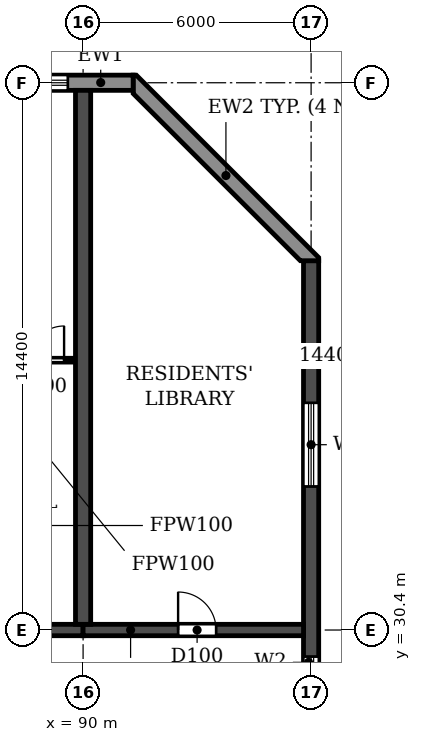
"""IFC4 building model, lengths in metres.
Left out: names, types, materials, properties, quantities, classifications, styles, units other than length and angle.
Written with IfcOpenShell. Run it as: python <this file> out.ifc"""

import sys

from ifc_helpers import new_model, si_unit, direction, frame, frame_2d, origin, place, context, subcontext, project, spatial, polyline, rectangle, outline, extrude, element, fill, save


model = new_model("IFC4")
c1 = context("Model", 3, precision=1e-05, world=origin(), true_north=direction((0.0, 1.0)))
c2 = subcontext(c1, "Body", "Model", "MODEL_VIEW")
j1 = project(units=[si_unit("LENGTHUNIT", "METRE"), si_unit("PLANEANGLEUNIT", "RADIAN")], contexts=[c1])
p1 = place(None, origin())
s1 = spatial("IfcSite", under=j1, at=p1, CompositionType="ELEMENT")
p2 = place(p1, origin())
s2 = spatial("IfcBuilding", under=s1, at=p2, CompositionType="ELEMENT")
p3 = place(p2, frame((0.0, 0.0, 63.0)))
s3 = spatial("IfcBuildingStorey", under=s2, at=p3, CompositionType="ELEMENT", Elevation=63.0)
p4 = place(p3, frame((90.0, 30.55, 0.0), z_axis=(0.0, 0.0, 1.0), x_axis=(0.0, 1.0, 0.0)))
e1 = element("IfcWall", 1, at=p4, inside=s3, PredefinedType="SHEAR", context=c2, shape_type="SweptSolid", body=[
    extrude(rectangle(XDim=14.05, YDim=0.4, at=frame_2d((7.025, 0.0))), origin(), (0.0, 0.0, 1.0), 2.95),
])
p5 = place(p3, frame((96.0, 4.683, 0.0), z_axis=(0.0, 0.0, 1.0), x_axis=(0.0, 1.0, 0.0)))
e2 = element("IfcWall", 2, at=p5, inside=s3, PredefinedType="SHEAR", context=c2, shape_type="SweptSolid", body=[
    extrude(rectangle(XDim=35.434, YDim=0.4, at=frame_2d((17.717, 0.0))), origin(), (0.0, 0.0, 1.0), 2.95),
])
p6 = place(p5, frame((15.917, 0.0, 0.9)))
e3 = element("IfcOpeningElement", 3, at=p6, cuts=e2, PredefinedType="OPENING", context=c2, shape_type="SweptSolid", body=[
    extrude(rectangle(XDim=1.2, YDim=1.5, at=frame_2d((0.6, 0.75))), frame((0.0, 0.21, 0.0), z_axis=(0.0, -1.0, 0.0), x_axis=(1.0, 0.0, 0.0)), (0.0, 0.0, 1.0), 0.42),
])
p7 = place(p5, frame((23.817, 0.0, 0.9)))
e4 = element("IfcOpeningElement", 4, at=p7, cuts=e2, PredefinedType="OPENING", context=c2, shape_type="SweptSolid", body=[
    extrude(rectangle(XDim=1.2, YDim=1.5, at=frame_2d((0.6, 0.75))), frame((0.0, 0.21, 0.0), z_axis=(0.0, -1.0, 0.0), x_axis=(1.0, 0.0, 0.0)), (0.0, 0.0, 1.0), 0.42),
])
p8 = place(p5, frame((8.017, 0.0, 0.9)))
e5 = element("IfcOpeningElement", 5, at=p8, cuts=e2, PredefinedType="OPENING", context=c2, shape_type="SweptSolid", body=[
    extrude(rectangle(XDim=1.2, YDim=1.5, at=frame_2d((0.6, 0.75))), frame((0.0, 0.21, 0.0), z_axis=(0.0, -1.0, 0.0), x_axis=(1.0, 0.0, 0.0)), (0.0, 0.0, 1.0), 0.42),
])
p9 = place(p5, frame((29.493, 0.0, 0.6)))
e6 = element("IfcOpeningElement", 6, at=p9, cuts=e2, PredefinedType="OPENING", context=c2, shape_type="SweptSolid", body=[
    extrude(rectangle(XDim=2.2, YDim=1.8, at=frame_2d((1.1, 0.9))), frame((0.0, 0.21, 0.0), z_axis=(0.0, -1.0, 0.0), x_axis=(1.0, 0.0, 0.0)), (0.0, 0.0, 1.0), 0.42),
])
p10 = place(p5, frame((2.541, 0.0, 0.6)))
e7 = element("IfcOpeningElement", 7, at=p10, cuts=e2, PredefinedType="OPENING", context=c2, shape_type="SweptSolid", body=[
    extrude(rectangle(XDim=2.2, YDim=1.8, at=frame_2d((1.1, 0.9))), frame((0.0, 0.21, 0.0), z_axis=(0.0, -1.0, 0.0), x_axis=(1.0, 0.0, 0.0)), (0.0, 0.0, 1.0), 0.42),
])
p11 = place(p3, frame((84.0, 30.4, 0.0), z_axis=(0.0, 0.0, 1.0), x_axis=(1.0, 0.0, 0.0)))
e8 = element("IfcWall", 8, at=p11, inside=s3, PredefinedType="SHEAR", context=c2, shape_type="SweptSolid", body=[
    extrude(rectangle(XDim=6.0, YDim=0.3, at=frame_2d((3.0, 0.0))), origin(), (0.0, 0.0, 1.0), 2.35),
])
p12 = place(p3, frame((90.0, 30.4, 0.0), z_axis=(0.0, 0.0, 1.0), x_axis=(1.0, 0.0, 0.0)))
e9 = element("IfcWall", 9, at=p12, inside=s3, PredefinedType="SHEAR", context=c2, shape_type="SweptSolid", body=[
    extrude(rectangle(XDim=5.8, YDim=0.3, at=frame_2d((2.9, 0.0))), origin(), (0.0, 0.0, 1.0), 2.35),
])
p13 = place(p12, frame((2.5, 0.0, 0.0)))
e10 = element("IfcOpeningElement", 10, at=p13, cuts=e9, PredefinedType="OPENING", context=c2, shape_type="SweptSolid", body=[
    extrude(rectangle(XDim=1.0, YDim=2.1, at=frame_2d((0.5, 1.05))), frame((0.0, 0.16, 0.0), z_axis=(0.0, -1.0, 0.0), x_axis=(1.0, 0.0, 0.0)), (0.0, 0.0, 1.0), 0.32),
])
p14 = place(p3, origin())
e11 = element("IfcWall", 11, at=p14, inside=s3, PredefinedType="STANDARD", context=c2, shape_type="SweptSolid", body=[
    extrude(outline(polyline([(96.2, 40.117), (96.2, 40.2), (91.4, 45.0), (91.317, 45.0), (91.317, 44.517), (95.717, 40.117), (96.2, 40.117)])), origin(), (0.0, 0.0, 1.0), 2.95),
])
p15 = place(p3, frame((91.317, 44.8, 0.0), z_axis=(0.0, 0.0, 1.0), x_axis=(-1.0, 0.0, 0.0)))
e12 = element("IfcWall", 12, at=p15, inside=s3, PredefinedType="STANDARD", context=c2, shape_type="SweptSolid", body=[
    extrude(rectangle(XDim=80.634, YDim=0.4, at=frame_2d((40.317, 0.0))), origin(), (0.0, 0.0, 1.0), 2.95),
])
p16 = place(p15, frame((76.717, 0.0, 0.9)))
e13 = element("IfcOpeningElement", 13, at=p16, cuts=e12, PredefinedType="OPENING", context=c2, shape_type="SweptSolid", body=[
    extrude(rectangle(XDim=2.2, YDim=1.5, at=frame_2d((1.1, 0.75))), frame((0.0, 0.21, 0.0), z_axis=(0.0, -1.0, 0.0), x_axis=(1.0, 0.0, 0.0)), (0.0, 0.0, 1.0), 0.42),
])
p17 = place(p15, frame((73.917, 0.0, 0.0)))
e14 = element("IfcOpeningElement", 14, at=p17, cuts=e12, PredefinedType="OPENING", context=c2, shape_type="SweptSolid", body=[
    extrude(rectangle(XDim=1.8, YDim=2.4, at=frame_2d((0.9, 1.2))), frame((0.0, 0.21, 0.0), z_axis=(0.0, -1.0, 0.0), x_axis=(1.0, 0.0, 0.0)), (0.0, 0.0, 1.0), 0.42),
])
p18 = place(p15, frame((70.717, 0.0, 0.9)))
e15 = element("IfcOpeningElement", 15, at=p18, cuts=e12, PredefinedType="OPENING", context=c2, shape_type="SweptSolid", body=[
    extrude(rectangle(XDim=2.2, YDim=1.5, at=frame_2d((1.1, 0.75))), frame((0.0, 0.21, 0.0), z_axis=(0.0, -1.0, 0.0), x_axis=(1.0, 0.0, 0.0)), (0.0, 0.0, 1.0), 0.42),
])
p19 = place(p15, frame((67.917, 0.0, 0.0)))
e16 = element("IfcOpeningElement", 16, at=p19, cuts=e12, PredefinedType="OPENING", context=c2, shape_type="SweptSolid", body=[
    extrude(rectangle(XDim=1.8, YDim=2.4, at=frame_2d((0.9, 1.2))), frame((0.0, 0.21, 0.0), z_axis=(0.0, -1.0, 0.0), x_axis=(1.0, 0.0, 0.0)), (0.0, 0.0, 1.0), 0.42),
])
p20 = place(p15, frame((64.717, 0.0, 0.9)))
e17 = element("IfcOpeningElement", 17, at=p20, cuts=e12, PredefinedType="OPENING", context=c2, shape_type="SweptSolid", body=[
    extrude(rectangle(XDim=2.2, YDim=1.5, at=frame_2d((1.1, 0.75))), frame((0.0, 0.21, 0.0), z_axis=(0.0, -1.0, 0.0), x_axis=(1.0, 0.0, 0.0)), (0.0, 0.0, 1.0), 0.42),
])
p21 = place(p15, frame((61.917, 0.0, 0.0)))
e18 = element("IfcOpeningElement", 18, at=p21, cuts=e12, PredefinedType="OPENING", context=c2, shape_type="SweptSolid", body=[
    extrude(rectangle(XDim=1.8, YDim=2.4, at=frame_2d((0.9, 1.2))), frame((0.0, 0.21, 0.0), z_axis=(0.0, -1.0, 0.0), x_axis=(1.0, 0.0, 0.0)), (0.0, 0.0, 1.0), 0.42),
])
p22 = place(p15, frame((58.717, 0.0, 0.9)))
e19 = element("IfcOpeningElement", 19, at=p22, cuts=e12, PredefinedType="OPENING", context=c2, shape_type="SweptSolid", body=[
    extrude(rectangle(XDim=2.2, YDim=1.5, at=frame_2d((1.1, 0.75))), frame((0.0, 0.21, 0.0), z_axis=(0.0, -1.0, 0.0), x_axis=(1.0, 0.0, 0.0)), (0.0, 0.0, 1.0), 0.42),
])
p23 = place(p15, frame((55.717, 0.0, 0.9)))
e20 = element("IfcOpeningElement", 20, at=p23, cuts=e12, PredefinedType="OPENING", context=c2, shape_type="SweptSolid", body=[
    extrude(rectangle(XDim=2.2, YDim=1.5, at=frame_2d((1.1, 0.75))), frame((0.0, 0.21, 0.0), z_axis=(0.0, -1.0, 0.0), x_axis=(1.0, 0.0, 0.0)), (0.0, 0.0, 1.0), 0.42),
])
p24 = place(p15, frame((52.917, 0.0, 0.0)))
e21 = element("IfcOpeningElement", 21, at=p24, cuts=e12, PredefinedType="OPENING", context=c2, shape_type="SweptSolid", body=[
    extrude(rectangle(XDim=1.8, YDim=2.4, at=frame_2d((0.9, 1.2))), frame((0.0, 0.21, 0.0), z_axis=(0.0, -1.0, 0.0), x_axis=(1.0, 0.0, 0.0)), (0.0, 0.0, 1.0), 0.42),
])
p25 = place(p15, frame((49.717, 0.0, 0.9)))
e22 = element("IfcOpeningElement", 22, at=p25, cuts=e12, PredefinedType="OPENING", context=c2, shape_type="SweptSolid", body=[
    extrude(rectangle(XDim=2.2, YDim=1.5, at=frame_2d((1.1, 0.75))), frame((0.0, 0.21, 0.0), z_axis=(0.0, -1.0, 0.0), x_axis=(1.0, 0.0, 0.0)), (0.0, 0.0, 1.0), 0.42),
])
p26 = place(p15, frame((46.917, 0.0, 0.0)))
e23 = element("IfcOpeningElement", 23, at=p26, cuts=e12, PredefinedType="OPENING", context=c2, shape_type="SweptSolid", body=[
    extrude(rectangle(XDim=1.8, YDim=2.4, at=frame_2d((0.9, 1.2))), frame((0.0, 0.21, 0.0), z_axis=(0.0, -1.0, 0.0), x_axis=(1.0, 0.0, 0.0)), (0.0, 0.0, 1.0), 0.42),
])
p27 = place(p15, frame((43.717, 0.0, 0.9)))
e24 = element("IfcOpeningElement", 24, at=p27, cuts=e12, PredefinedType="OPENING", context=c2, shape_type="SweptSolid", body=[
    extrude(rectangle(XDim=2.2, YDim=1.5, at=frame_2d((1.1, 0.75))), frame((0.0, 0.21, 0.0), z_axis=(0.0, -1.0, 0.0), x_axis=(1.0, 0.0, 0.0)), (0.0, 0.0, 1.0), 0.42),
])
p28 = place(p15, frame((40.717, 0.0, 0.9)))
e25 = element("IfcOpeningElement", 25, at=p28, cuts=e12, PredefinedType="OPENING", context=c2, shape_type="SweptSolid", body=[
    extrude(rectangle(XDim=2.2, YDim=1.5, at=frame_2d((1.1, 0.75))), frame((0.0, 0.21, 0.0), z_axis=(0.0, -1.0, 0.0), x_axis=(1.0, 0.0, 0.0)), (0.0, 0.0, 1.0), 0.42),
])
p29 = place(p15, frame((37.717, 0.0, 0.9)))
e26 = element("IfcOpeningElement", 26, at=p29, cuts=e12, PredefinedType="OPENING", context=c2, shape_type="SweptSolid", body=[
    extrude(rectangle(XDim=2.2, YDim=1.5, at=frame_2d((1.1, 0.75))), frame((0.0, 0.21, 0.0), z_axis=(0.0, -1.0, 0.0), x_axis=(1.0, 0.0, 0.0)), (0.0, 0.0, 1.0), 0.42),
])
p30 = place(p15, frame((34.717, 0.0, 0.9)))
e27 = element("IfcOpeningElement", 27, at=p30, cuts=e12, PredefinedType="OPENING", context=c2, shape_type="SweptSolid", body=[
    extrude(rectangle(XDim=2.2, YDim=1.5, at=frame_2d((1.1, 0.75))), frame((0.0, 0.21, 0.0), z_axis=(0.0, -1.0, 0.0), x_axis=(1.0, 0.0, 0.0)), (0.0, 0.0, 1.0), 0.42),
])
p31 = place(p15, frame((31.917, 0.0, 0.0)))
e28 = element("IfcOpeningElement", 28, at=p31, cuts=e12, PredefinedType="OPENING", context=c2, shape_type="SweptSolid", body=[
    extrude(rectangle(XDim=1.8, YDim=2.4, at=frame_2d((0.9, 1.2))), frame((0.0, 0.21, 0.0), z_axis=(0.0, -1.0, 0.0), x_axis=(1.0, 0.0, 0.0)), (0.0, 0.0, 1.0), 0.42),
])
p32 = place(p15, frame((28.917, 0.0, 0.0)))
e29 = element("IfcOpeningElement", 29, at=p32, cuts=e12, PredefinedType="OPENING", context=c2, shape_type="SweptSolid", body=[
    extrude(rectangle(XDim=1.8, YDim=2.4, at=frame_2d((0.9, 1.2))), frame((0.0, 0.21, 0.0), z_axis=(0.0, -1.0, 0.0), x_axis=(1.0, 0.0, 0.0)), (0.0, 0.0, 1.0), 0.42),
])
p33 = place(p15, frame((25.717, 0.0, 0.9)))
e30 = element("IfcOpeningElement", 30, at=p33, cuts=e12, PredefinedType="OPENING", context=c2, shape_type="SweptSolid", body=[
    extrude(rectangle(XDim=2.2, YDim=1.5, at=frame_2d((1.1, 0.75))), frame((0.0, 0.21, 0.0), z_axis=(0.0, -1.0, 0.0), x_axis=(1.0, 0.0, 0.0)), (0.0, 0.0, 1.0), 0.42),
])
p34 = place(p15, frame((22.917, 0.0, 0.0)))
e31 = element("IfcOpeningElement", 31, at=p34, cuts=e12, PredefinedType="OPENING", context=c2, shape_type="SweptSolid", body=[
    extrude(rectangle(XDim=1.8, YDim=2.4, at=frame_2d((0.9, 1.2))), frame((0.0, 0.21, 0.0), z_axis=(0.0, -1.0, 0.0), x_axis=(1.0, 0.0, 0.0)), (0.0, 0.0, 1.0), 0.42),
])
p35 = place(p15, frame((19.717, 0.0, 0.9)))
e32 = element("IfcOpeningElement", 32, at=p35, cuts=e12, PredefinedType="OPENING", context=c2, shape_type="SweptSolid", body=[
    extrude(rectangle(XDim=2.2, YDim=1.5, at=frame_2d((1.1, 0.75))), frame((0.0, 0.21, 0.0), z_axis=(0.0, -1.0, 0.0), x_axis=(1.0, 0.0, 0.0)), (0.0, 0.0, 1.0), 0.42),
])
p36 = place(p15, frame((16.917, 0.0, 0.0)))
e33 = element("IfcOpeningElement", 33, at=p36, cuts=e12, PredefinedType="OPENING", context=c2, shape_type="SweptSolid", body=[
    extrude(rectangle(XDim=1.8, YDim=2.4, at=frame_2d((0.9, 1.2))), frame((0.0, 0.21, 0.0), z_axis=(0.0, -1.0, 0.0), x_axis=(1.0, 0.0, 0.0)), (0.0, 0.0, 1.0), 0.42),
])
p37 = place(p15, frame((13.717, 0.0, 0.9)))
e34 = element("IfcOpeningElement", 34, at=p37, cuts=e12, PredefinedType="OPENING", context=c2, shape_type="SweptSolid", body=[
    extrude(rectangle(XDim=2.2, YDim=1.5, at=frame_2d((1.1, 0.75))), frame((0.0, 0.21, 0.0), z_axis=(0.0, -1.0, 0.0), x_axis=(1.0, 0.0, 0.0)), (0.0, 0.0, 1.0), 0.42),
])
p38 = place(p15, frame((10.917, 0.0, 0.0)))
e35 = element("IfcOpeningElement", 35, at=p38, cuts=e12, PredefinedType="OPENING", context=c2, shape_type="SweptSolid", body=[
    extrude(rectangle(XDim=1.8, YDim=2.4, at=frame_2d((0.9, 1.2))), frame((0.0, 0.21, 0.0), z_axis=(0.0, -1.0, 0.0), x_axis=(1.0, 0.0, 0.0)), (0.0, 0.0, 1.0), 0.42),
])
p39 = place(p15, frame((7.717, 0.0, 0.9)))
e36 = element("IfcOpeningElement", 36, at=p39, cuts=e12, PredefinedType="OPENING", context=c2, shape_type="SweptSolid", body=[
    extrude(rectangle(XDim=2.2, YDim=1.5, at=frame_2d((1.1, 0.75))), frame((0.0, 0.21, 0.0), z_axis=(0.0, -1.0, 0.0), x_axis=(1.0, 0.0, 0.0)), (0.0, 0.0, 1.0), 0.42),
])
p40 = place(p15, frame((4.717, 0.0, 0.9)))
e37 = element("IfcOpeningElement", 37, at=p40, cuts=e12, PredefinedType="OPENING", context=c2, shape_type="SweptSolid", body=[
    extrude(rectangle(XDim=2.2, YDim=1.5, at=frame_2d((1.1, 0.75))), frame((0.0, 0.21, 0.0), z_axis=(0.0, -1.0, 0.0), x_axis=(1.0, 0.0, 0.0)), (0.0, 0.0, 1.0), 0.42),
])
p41 = place(p15, frame((1.717, 0.0, 0.9)))
e38 = element("IfcOpeningElement", 38, at=p41, cuts=e12, PredefinedType="OPENING", context=c2, shape_type="SweptSolid", body=[
    extrude(rectangle(XDim=2.2, YDim=1.5, at=frame_2d((1.1, 0.75))), frame((0.0, 0.21, 0.0), z_axis=(0.0, -1.0, 0.0), x_axis=(1.0, 0.0, 0.0)), (0.0, 0.0, 1.0), 0.42),
])
p42 = place(p3, frame((84.21, 37.5, 0.0), z_axis=(0.0, 0.0, 1.0), x_axis=(1.0, 0.0, 0.0)))
e39 = element("IfcWall", 39, at=p42, inside=s3, PredefinedType="PARTITIONING", context=c2, shape_type="SweptSolid", body=[
    extrude(rectangle(XDim=5.58, YDim=0.1, at=frame_2d((2.79, 0.0))), origin(), (0.0, 0.0, 1.0), 2.95),
])
p43 = place(p42, frame((0.29, 0.0, 0.0)))
e40 = element("IfcOpeningElement", 40, at=p43, cuts=e39, PredefinedType="OPENING", context=c2, shape_type="SweptSolid", body=[
    extrude(rectangle(XDim=0.9, YDim=2.1, at=frame_2d((0.45, 1.05))), frame((0.0, 0.06, 0.0), z_axis=(0.0, -1.0, 0.0), x_axis=(1.0, 0.0, 0.0)), (0.0, 0.0, 1.0), 0.12),
])
p44 = place(p42, frame((4.39, 0.0, 0.0)))
e41 = element("IfcOpeningElement", 41, at=p44, cuts=e39, PredefinedType="OPENING", context=c2, shape_type="SweptSolid", body=[
    extrude(rectangle(XDim=0.9, YDim=2.1, at=frame_2d((0.45, 1.05))), frame((0.0, 0.06, 0.0), z_axis=(0.0, -1.0, 0.0), x_axis=(1.0, 0.0, 0.0)), (0.0, 0.0, 1.0), 0.12),
])
p45 = place(p7, origin())
e42 = element("IfcWindow", 42, at=p45, inside=s3, PartitioningType="SINGLE_PANEL", PredefinedType="WINDOW", context=c2, shape_type="SweptSolid", body=[
    extrude(rectangle(XDim=1.2, YDim=1.5, at=frame_2d((0.6, 0.75))), frame((0.0, 0.03, 0.0), z_axis=(0.0, -1.0, 0.0), x_axis=(1.0, 0.0, 0.0)), (0.0, 0.0, 1.0), 0.06),
])
fill(e4, e42)
p46 = place(p9, origin())
e43 = element("IfcWindow", 43, at=p46, inside=s3, PartitioningType="DOUBLE_PANEL_HORIZONTAL", PredefinedType="WINDOW", context=c2, shape_type="SweptSolid", body=[
    extrude(rectangle(XDim=2.2, YDim=1.8, at=frame_2d((1.1, 0.9))), frame((0.0, 0.03, 0.0), z_axis=(0.0, -1.0, 0.0), x_axis=(1.0, 0.0, 0.0)), (0.0, 0.0, 1.0), 0.06),
])
fill(e6, e43)
p47 = place(p41, origin())
e44 = element("IfcWindow", 44, at=p47, inside=s3, PartitioningType="DOUBLE_PANEL_HORIZONTAL", PredefinedType="WINDOW", context=c2, shape_type="SweptSolid", body=[
    extrude(rectangle(XDim=2.2, YDim=1.5, at=frame_2d((1.1, 0.75))), frame((0.0, 0.03, 0.0), z_axis=(0.0, -1.0, 0.0), x_axis=(1.0, 0.0, 0.0)), (0.0, 0.0, 1.0), 0.06),
])
fill(e38, e44)
p48 = place(p44, origin())
e45 = element("IfcDoor", 45, at=p48, inside=s3, OperationType="SINGLE_SWING_RIGHT", PredefinedType="DOOR", context=c2, shape_type="SweptSolid", body=[
    extrude(rectangle(XDim=0.9, YDim=2.1, at=frame_2d((0.45, 1.05))), frame((0.0, 0.025, 0.0), z_axis=(0.0, -1.0, 0.0), x_axis=(1.0, 0.0, 0.0)), (0.0, 0.0, 1.0), 0.05),
])
fill(e41, e45)
p49 = place(p13, origin())
e46 = element("IfcDoor", 46, at=p49, inside=s3, OperationType="SINGLE_SWING_LEFT", PredefinedType="DOOR", context=c2, shape_type="SweptSolid", body=[
    extrude(rectangle(XDim=1.0, YDim=2.1, at=frame_2d((0.5, 1.05))), frame((0.0, 0.025, 0.0), z_axis=(0.0, -1.0, 0.0), x_axis=(1.0, 0.0, 0.0)), (0.0, 0.0, 1.0), 0.05),
])
fill(e10, e46)
save(model, sys.argv[1])
